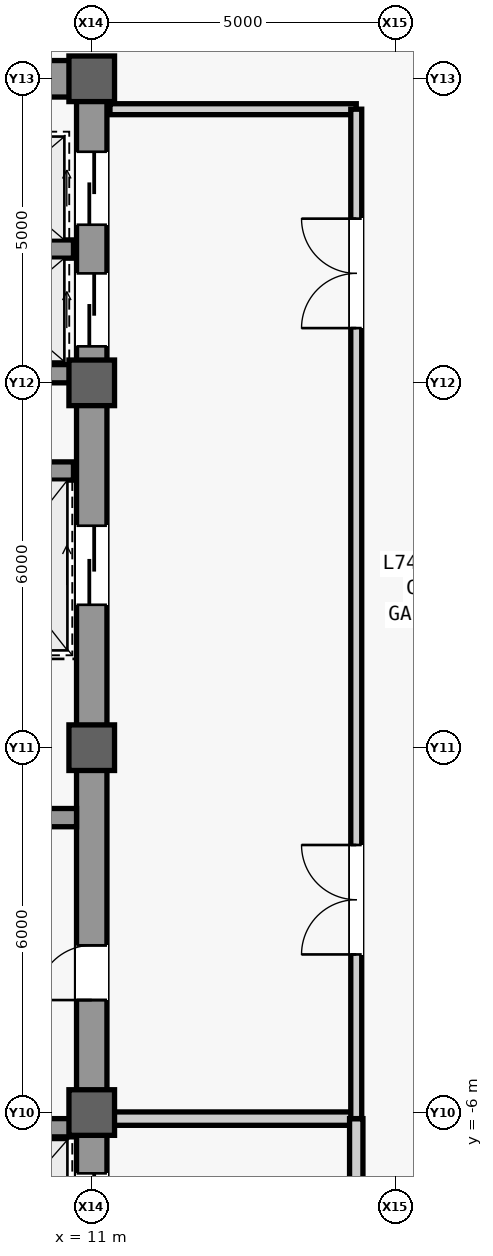
"""IFC4 building model, lengths in metres.
Left out: names, types, materials, properties, quantities, classifications, styles, units other than length and angle.
Written with IfcOpenShell. Run it as: python <this file> out.ifc"""

import sys

from ifc_helpers import new_model, si_unit, direction, frame, frame_2d, origin, origin_2d, place, context, subcontext, project, spatial, rectangle, extrude, source, transform, mapped, element, fill, save


model = new_model("IFC4")
c1 = context("Model", 3, precision=1e-05, world=origin(), true_north=direction((0.0, 1.0)))
c2 = subcontext(c1, "Body", "Model", "MODEL_VIEW")
j1 = project(units=[si_unit("LENGTHUNIT", "METRE"), si_unit("PLANEANGLEUNIT", "RADIAN")], contexts=[c1])
p1 = place(None, origin())
s1 = spatial("IfcSite", under=j1, at=p1, CompositionType="ELEMENT")
p2 = place(p1, origin())
s2 = spatial("IfcBuilding", under=s1, at=p2, CompositionType="ELEMENT")
p3 = place(p2, frame((0.0, 0.0, 313.5)))
s3 = spatial("IfcBuildingStorey", under=s2, at=p3, CompositionType="ELEMENT", Elevation=313.5)
m1 = source(origin(), c2, "Body", "SweptSolid", [
    extrude(rectangle(XDim=22.0, YDim=0.5, at=frame_2d((11.0, 0.0))), origin(), (0.0, 0.0, 1.0), 3.78),
])
p4 = place(p3, frame((11.0, -11.0, 0.0), z_axis=(0.0, 0.0, 1.0), x_axis=(0.0, 1.0, 0.0)))
e1 = element("IfcWall", 1, at=p4, inside=s3, PredefinedType="SHEAR", context=c2, shape_type="MappedRepresentation", body=[
    mapped(m1, transform((0.0, 0.0, 0.0), scale=1.0)),
])
m2 = source(origin(), c2, "Body", "SweptSolid", [
    extrude(rectangle(XDim=1.1, YDim=2.2, at=frame_2d((0.55, 1.1))), frame((0.0, 0.26, 0.0), z_axis=(0.0, -1.0, 0.0), x_axis=(1.0, 0.0, 0.0)), (0.0, 0.0, 1.0), 0.52),
])
p5 = place(p4, frame((0.8, 0.0, 0.0)))
e2 = element("IfcOpeningElement", 2, at=p5, cuts=e1, PredefinedType="OPENING", context=c2, shape_type="MappedRepresentation", body=[
    mapped(m2, transform((0.0, 0.0, 0.0), scale=1.0)),
])
m3 = source(origin(), c2, "Body", "SweptSolid", [
    extrude(rectangle(XDim=0.9, YDim=2.15, at=frame_2d((0.45, 1.075))), frame((0.0, 0.26, 0.0), z_axis=(0.0, -1.0, 0.0), x_axis=(1.0, 0.0, 0.0)), (0.0, 0.0, 1.0), 0.52),
])
p6 = place(p4, frame((6.85, 0.0, 0.0)))
e3 = element("IfcOpeningElement", 3, at=p6, cuts=e1, PredefinedType="OPENING", context=c2, shape_type="MappedRepresentation", body=[
    mapped(m3, transform((0.0, 0.0, 0.0), scale=1.0)),
])
m4 = source(origin(), c2, "Body", "SweptSolid", [
    extrude(rectangle(XDim=1.2, YDim=2.3, at=frame_2d((0.6, 1.15))), frame((0.0, 0.26, 0.0), z_axis=(0.0, -1.0, 0.0), x_axis=(1.0, 0.0, 0.0)), (0.0, 0.0, 1.0), 0.52),
])
p7 = place(p4, frame((17.6, 0.0, 0.0)))
e4 = element("IfcOpeningElement", 4, at=p7, cuts=e1, PredefinedType="OPENING", context=c2, shape_type="MappedRepresentation", body=[
    mapped(m4, transform((0.0, 0.0, 0.0), scale=1.0)),
])
p8 = place(p4, frame((19.6, 0.0, 0.0)))
e5 = element("IfcOpeningElement", 5, at=p8, cuts=e1, PredefinedType="OPENING", context=c2, shape_type="MappedRepresentation", body=[
    mapped(m4, transform((0.0, 0.0, 0.0), scale=1.0)),
])
m5 = source(origin(), c2, "Body", "SweptSolid", [
    extrude(rectangle(XDim=1.3, YDim=2.3, at=frame_2d((0.65, 1.15))), frame((0.0, 0.26, 0.0), z_axis=(0.0, -1.0, 0.0), x_axis=(1.0, 0.0, 0.0)), (0.0, 0.0, 1.0), 0.52),
])
p9 = place(p4, frame((2.7, 0.0, 0.0)))
e6 = element("IfcOpeningElement", 6, at=p9, cuts=e1, PredefinedType="OPENING", context=c2, shape_type="MappedRepresentation", body=[
    mapped(m5, transform((0.0, 0.0, 0.0), scale=1.0)),
])
p10 = place(p4, frame((13.35, 0.0, 0.0)))
e7 = element("IfcOpeningElement", 7, at=p10, cuts=e1, PredefinedType="OPENING", context=c2, shape_type="MappedRepresentation", body=[
    mapped(m5, transform((0.0, 0.0, 0.0), scale=1.0)),
])
m6 = source(origin(), c2, "Body", "SweptSolid", [
    extrude(rectangle(XDim=5.9, YDim=0.6, at=frame_2d((2.95, 0.0))), origin(), (0.0, 0.0, 1.0), 3.78),
])
p11 = place(p3, frame((4.85, 11.0, 0.0), z_axis=(0.0, 0.0, 1.0), x_axis=(1.0, 0.0, 0.0)))
e8 = element("IfcWall", 8, at=p11, inside=s3, PredefinedType="SHEAR", context=c2, shape_type="MappedRepresentation", body=[
    mapped(m6, transform((0.0, 0.0, 0.0), scale=1.0)),
])
m7 = source(origin(), c2, "Body", "SweptSolid", [
    extrude(rectangle(XDim=1.05, YDim=2.2, at=frame_2d((0.525, 1.1))), frame((0.0, 0.31, 0.0), z_axis=(0.0, -1.0, 0.0), x_axis=(1.0, 0.0, 0.0)), (0.0, 0.0, 1.0), 0.62),
])
p12 = place(p11, frame((1.375, 0.0, 0.0)))
e9 = element("IfcOpeningElement", 9, at=p12, cuts=e8, PredefinedType="OPENING", context=c2, shape_type="MappedRepresentation", body=[
    mapped(m7, transform((0.0, 0.0, 0.0), scale=1.0)),
])
m8 = source(origin(), c2, "Body", "SweptSolid", [
    extrude(rectangle(XDim=5.65, YDim=0.3, at=frame_2d((2.825, 0.0))), origin(), (0.0, 0.0, 1.0), 3.78),
])
p13 = place(p3, frame((5.1, -1.15, 0.0), z_axis=(0.0, 0.0, 1.0), x_axis=(1.0, 0.0, 0.0)))
e10 = element("IfcWall", 10, at=p13, inside=s3, PredefinedType="SHEAR", context=c2, shape_type="MappedRepresentation", body=[
    mapped(m8, transform((0.0, 0.0, 0.0), scale=1.0)),
])
m9 = source(origin(), c2, "Body", "SweptSolid", [
    extrude(rectangle(XDim=0.75, YDim=0.75, at=origin_2d()), origin(), (0.0, 0.0, 1.0), 4.0),
])
for number, where, z_axis, x_axis in (
    (11, (11.0, -6.0, 0.0), (0.0, 0.0, 1.0), (1.0, 0.0, 0.0)),
    (12, (11.0, 0.0, 0.0), (0.0, 0.0, 1.0), (1.0, 0.0, 0.0)),
    (13, (11.0, 6.0, 0.0), (0.0, 0.0, 1.0), (1.0, 0.0, 0.0)),
    (14, (11.0, 11.0, 0.0), (0.0, 0.0, 1.0), (1.0, 0.0, 0.0)),
):
    element("IfcColumn", number, at=place(p3, frame(where, z_axis=z_axis, x_axis=x_axis)), inside=s3, PredefinedType="COLUMN", context=c2, shape_type="MappedRepresentation", body=[
        mapped(m9, transform((0.0, 0.0, 0.0), scale=1.0)),
    ])
m10 = source(origin(), c2, "Body", "SweptSolid", [
    extrude(rectangle(XDim=2.2, YDim=0.3, at=frame_2d((1.1, 0.0))), origin(), (0.0, 0.0, 1.0), 3.78),
])
p14 = place(p3, frame((8.5, -6.25, 0.0), z_axis=(0.0, 0.0, 1.0), x_axis=(1.0, 0.0, 0.0)))
e15 = element("IfcWall", 15, at=p14, inside=s3, PredefinedType="SHEAR", context=c2, shape_type="MappedRepresentation", body=[
    mapped(m10, transform((0.0, 0.0, 0.0), scale=1.0)),
])
m11 = source(origin(), c2, "Body", "SweptSolid", [
    extrude(rectangle(XDim=2.3, YDim=0.3, at=frame_2d((1.15, 0.0))), origin(), (0.0, 0.0, 1.0), 3.78),
])
for number, where, z_axis, x_axis in (
    (16, (8.4, 4.55, 0.0), (0.0, 0.0, 1.0), (1.0, 0.0, 0.0)),
    (17, (8.4, 6.15, 0.0), (0.0, 0.0, 1.0), (1.0, 0.0, 0.0)),
    (18, (8.4, 8.2, 0.0), (0.0, 0.0, 1.0), (1.0, 0.0, 0.0)),
):
    element("IfcWall", number, at=place(p3, frame(where, z_axis=z_axis, x_axis=x_axis)), inside=s3, PredefinedType="SHEAR", context=c2, shape_type="MappedRepresentation", body=[
        mapped(m11, transform((0.0, 0.0, 0.0), scale=1.0)),
    ])
m12 = source(origin(), c2, "Body", "SweptSolid", [
    extrude(rectangle(XDim=4.05, YDim=0.22, at=frame_2d((2.025, 0.0))), origin(), (0.0, 0.0, 1.0), 3.085),
])
p15 = place(p3, frame((11.3, -6.1, 0.0), z_axis=(0.0, 0.0, 1.0), x_axis=(1.0, 0.0, 0.0)))
e19 = element("IfcWall", 19, at=p15, inside=s3, PredefinedType="PARTITIONING", context=c2, shape_type="MappedRepresentation", body=[
    mapped(m12, transform((0.0, 0.0, 0.0), scale=1.0)),
])
m13 = source(origin(), c2, "Body", "SweptSolid", [
    extrude(rectangle(XDim=4.4, YDim=0.22, at=frame_2d((2.2, 0.0))), origin(), (0.0, 0.0, 1.0), 3.78),
])
p16 = place(p3, frame((15.35, -10.5, 0.0), z_axis=(0.0, 0.0, 1.0), x_axis=(0.0, 1.0, 0.0)))
e20 = element("IfcWall", 20, at=p16, inside=s3, PredefinedType="PARTITIONING", context=c2, shape_type="MappedRepresentation", body=[
    mapped(m13, transform((0.0, 0.0, 0.0), scale=1.0)),
])
m14 = source(origin(), c2, "Body", "SweptSolid", [
    extrude(rectangle(XDim=1.2, YDim=2.2, at=frame_2d((0.6, 1.1))), frame((0.0, 0.12, 0.0), z_axis=(0.0, -1.0, 0.0), x_axis=(1.0, 0.0, 0.0)), (0.0, 0.0, 1.0), 0.24),
])
p17 = place(p16, frame((1.6, 0.0, 0.0)))
e21 = element("IfcOpeningElement", 21, at=p17, cuts=e20, PredefinedType="OPENING", context=c2, shape_type="MappedRepresentation", body=[
    mapped(m14, transform((0.0, 0.0, 0.0), scale=1.0)),
])
m15 = source(origin(), c2, "Body", "SweptSolid", [
    extrude(rectangle(XDim=4.05, YDim=0.18, at=frame_2d((2.025, 0.0))), origin(), (0.0, 0.0, 1.0), 3.78),
])
p18 = place(p3, frame((11.3, 10.5, 0.0), z_axis=(0.0, 0.0, 1.0), x_axis=(1.0, 0.0, 0.0)))
e22 = element("IfcWall", 22, at=p18, inside=s3, PredefinedType="PARTITIONING", context=c2, shape_type="MappedRepresentation", body=[
    mapped(m15, transform((0.0, 0.0, 0.0), scale=1.0)),
])
m16 = source(origin(), c2, "Body", "SweptSolid", [
    extrude(rectangle(XDim=16.6, YDim=0.18, at=frame_2d((8.3, 0.0))), origin(), (0.0, 0.0, 1.0), 3.78),
])
p19 = place(p3, frame((15.35, -6.1, 0.0), z_axis=(0.0, 0.0, 1.0), x_axis=(0.0, 1.0, 0.0)))
e23 = element("IfcWall", 23, at=p19, inside=s3, PredefinedType="PARTITIONING", context=c2, shape_type="MappedRepresentation", body=[
    mapped(m16, transform((0.0, 0.0, 0.0), scale=1.0)),
])
m17 = source(origin(), c2, "Body", "SweptSolid", [
    extrude(rectangle(XDim=1.8, YDim=2.25, at=frame_2d((0.9, 1.125))), frame((0.0, 0.1, 0.0), z_axis=(0.0, -1.0, 0.0), x_axis=(1.0, 0.0, 0.0)), (0.0, 0.0, 1.0), 0.2),
])
p20 = place(p19, frame((2.7, 0.0, 0.0)))
e24 = element("IfcOpeningElement", 24, at=p20, cuts=e23, PredefinedType="OPENING", context=c2, shape_type="MappedRepresentation", body=[
    mapped(m17, transform((0.0, 0.0, 0.0), scale=1.0)),
])
p21 = place(p19, frame((13.0, 0.0, 0.0)))
e25 = element("IfcOpeningElement", 25, at=p21, cuts=e23, PredefinedType="OPENING", context=c2, shape_type="MappedRepresentation", body=[
    mapped(m17, transform((0.0, 0.0, 0.0), scale=1.0)),
])
m18 = source(origin(), c2, "Body", "SweptSolid", [
    extrude(rectangle(XDim=0.9, YDim=2.15, at=frame_2d((0.45, 1.075))), frame((0.0, 0.025, 0.0), z_axis=(0.0, -1.0, 0.0), x_axis=(1.0, 0.0, 0.0)), (0.0, 0.0, 1.0), 0.05),
])
p22 = place(p6, origin())
e26 = element("IfcDoor", 26, at=p22, inside=s3, OperationType="SINGLE_SWING_LEFT", PredefinedType="DOOR", context=c2, shape_type="MappedRepresentation", body=[
    mapped(m18, transform((0.0, 0.0, 0.0), scale=1.0)),
])
fill(e3, e26)
m19 = source(origin(), c2, "Body", "SweptSolid", [
    extrude(rectangle(XDim=1.8, YDim=2.25, at=frame_2d((0.9, 1.125))), frame((0.0, 0.025, 0.0), z_axis=(0.0, -1.0, 0.0), x_axis=(1.0, 0.0, 0.0)), (0.0, 0.0, 1.0), 0.05),
])
p23 = place(p20, origin())
e27 = element("IfcDoor", 27, at=p23, inside=s3, OperationType="SINGLE_SWING_RIGHT", PredefinedType="DOOR", context=c2, shape_type="MappedRepresentation", body=[
    mapped(m19, transform((0.0, 0.0, 0.0), scale=1.0)),
])
fill(e24, e27)
p24 = place(p21, origin())
e28 = element("IfcDoor", 28, at=p24, inside=s3, OperationType="SINGLE_SWING_LEFT", PredefinedType="DOOR", context=c2, shape_type="MappedRepresentation", body=[
    mapped(m19, transform((0.0, 0.0, 0.0), scale=1.0)),
])
fill(e25, e28)
m20 = source(origin(), c2, "Body", "SweptSolid", [
    extrude(rectangle(XDim=1.2, YDim=2.3, at=frame_2d((0.6, 1.15))), frame((0.0, 0.025, 0.0), z_axis=(0.0, -1.0, 0.0), x_axis=(1.0, 0.0, 0.0)), (0.0, 0.0, 1.0), 0.05),
])
p25 = place(p7, origin())
e29 = element("IfcDoor", 29, at=p25, inside=s3, OperationType="SLIDING_TO_LEFT", PredefinedType="DOOR", context=c2, shape_type="MappedRepresentation", body=[
    mapped(m20, transform((0.0, 0.0, 0.0), scale=1.0)),
])
fill(e4, e29)
p26 = place(p8, origin())
e30 = element("IfcDoor", 30, at=p26, inside=s3, OperationType="SLIDING_TO_LEFT", PredefinedType="DOOR", context=c2, shape_type="MappedRepresentation", body=[
    mapped(m20, transform((0.0, 0.0, 0.0), scale=1.0)),
])
fill(e5, e30)
m21 = source(origin(), c2, "Body", "SweptSolid", [
    extrude(rectangle(XDim=1.3, YDim=2.3, at=frame_2d((0.65, 1.15))), frame((0.0, 0.025, 0.0), z_axis=(0.0, -1.0, 0.0), x_axis=(1.0, 0.0, 0.0)), (0.0, 0.0, 1.0), 0.05),
])
p27 = place(p9, origin())
e31 = element("IfcDoor", 31, at=p27, inside=s3, OperationType="SLIDING_TO_LEFT", PredefinedType="DOOR", context=c2, shape_type="MappedRepresentation", body=[
    mapped(m21, transform((0.0, 0.0, 0.0), scale=1.0)),
])
fill(e6, e31)
p28 = place(p10, origin())
e32 = element("IfcDoor", 32, at=p28, inside=s3, OperationType="SLIDING_TO_LEFT", PredefinedType="DOOR", context=c2, shape_type="MappedRepresentation", body=[
    mapped(m21, transform((0.0, 0.0, 0.0), scale=1.0)),
])
fill(e7, e32)
save(model, sys.argv[1])
